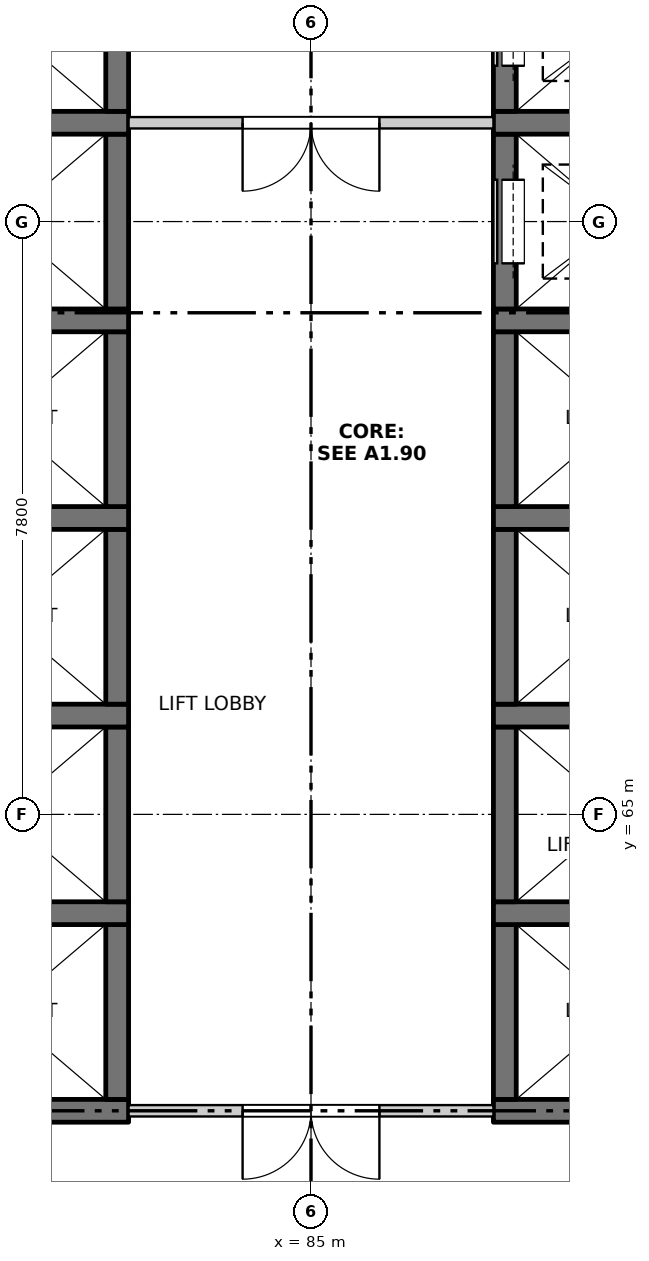
"""IFC4 building model, lengths in metres.
Left out: names, types, materials, properties, quantities, classifications, styles, units other than length and angle.
Written with IfcOpenShell. Run it as: python <this file> out.ifc"""

import sys

from ifc_helpers import new_model, si_unit, direction, frame, frame_2d, origin, place, context, subcontext, project, spatial, rectangle, extrude, element, fill, save


model = new_model("IFC4")
c1 = context("Model", 3, precision=1e-05, world=origin(), true_north=direction((0.0, 1.0)))
c2 = subcontext(c1, "Body", "Model", "MODEL_VIEW")
j1 = project(units=[si_unit("LENGTHUNIT", "METRE"), si_unit("PLANEANGLEUNIT", "RADIAN")], contexts=[c1])
p1 = place(None, origin())
s1 = spatial("IfcSite", under=j1, at=p1, CompositionType="ELEMENT")
p2 = place(p1, origin())
s2 = spatial("IfcBuilding", under=s1, at=p2, CompositionType="ELEMENT")
p3 = place(p2, frame((0.0, 0.0, 137.3)))
s3 = spatial("IfcBuildingStorey", under=s2, at=p3, CompositionType="ELEMENT", Elevation=137.3)
p4 = place(p3, frame((79.6, 61.1, -0.25), z_axis=(0.0, 0.0, 1.0), x_axis=(1.0, 0.0, 0.0)))
e1 = element("IfcWall", 1, at=p4, inside=s3, PredefinedType="SOLIDWALL", context=c2, shape_type="SweptSolid", body=[
    extrude(rectangle(XDim=3.0, YDim=0.3, at=frame_2d((1.5, 0.0))), origin(), (0.0, 0.0, 1.0), 3.4),
])
p5 = place(p3, frame((82.45, 61.25, -0.25), z_axis=(0.0, 0.0, 1.0), x_axis=(0.0, 1.0, 0.0)))
e2 = element("IfcWall", 2, at=p5, inside=s3, PredefinedType="SOLIDWALL", context=c2, shape_type="SweptSolid", body=[
    extrude(rectangle(XDim=2.3, YDim=0.3, at=frame_2d((1.15, 0.0))), origin(), (0.0, 0.0, 1.0), 3.4),
])
p6 = place(p3, frame((79.6, 63.7, -0.25), z_axis=(0.0, 0.0, 1.0), x_axis=(1.0, 0.0, 0.0)))
e3 = element("IfcWall", 3, at=p6, inside=s3, PredefinedType="SOLIDWALL", context=c2, shape_type="SweptSolid", body=[
    extrude(rectangle(XDim=3.0, YDim=0.3, at=frame_2d((1.5, 0.0))), origin(), (0.0, 0.0, 1.0), 3.4),
])
p7 = place(p3, frame((82.45, 63.85, -0.25), z_axis=(0.0, 0.0, 1.0), x_axis=(0.0, 1.0, 0.0)))
e4 = element("IfcWall", 4, at=p7, inside=s3, PredefinedType="SOLIDWALL", context=c2, shape_type="SweptSolid", body=[
    extrude(rectangle(XDim=2.3, YDim=0.3, at=frame_2d((1.15, 0.0))), origin(), (0.0, 0.0, 1.0), 3.4),
])
p8 = place(p3, frame((79.6, 66.3, -0.25), z_axis=(0.0, 0.0, 1.0), x_axis=(1.0, 0.0, 0.0)))
e5 = element("IfcWall", 5, at=p8, inside=s3, PredefinedType="SOLIDWALL", context=c2, shape_type="SweptSolid", body=[
    extrude(rectangle(XDim=3.0, YDim=0.3, at=frame_2d((1.5, 0.0))), origin(), (0.0, 0.0, 1.0), 3.4),
])
p9 = place(p3, frame((82.45, 66.45, -0.25), z_axis=(0.0, 0.0, 1.0), x_axis=(0.0, 1.0, 0.0)))
e6 = element("IfcWall", 6, at=p9, inside=s3, PredefinedType="SOLIDWALL", context=c2, shape_type="SweptSolid", body=[
    extrude(rectangle(XDim=2.3, YDim=0.3, at=frame_2d((1.15, 0.0))), origin(), (0.0, 0.0, 1.0), 3.4),
])
p10 = place(p3, frame((79.6, 68.9, -0.25), z_axis=(0.0, 0.0, 1.0), x_axis=(1.0, 0.0, 0.0)))
e7 = element("IfcWall", 7, at=p10, inside=s3, PredefinedType="SOLIDWALL", context=c2, shape_type="SweptSolid", body=[
    extrude(rectangle(XDim=3.0, YDim=0.3, at=frame_2d((1.5, 0.0))), origin(), (0.0, 0.0, 1.0), 3.4),
])
p11 = place(p3, frame((82.45, 69.05, -0.25), z_axis=(0.0, 0.0, 1.0), x_axis=(0.0, 1.0, 0.0)))
e8 = element("IfcWall", 8, at=p11, inside=s3, PredefinedType="SOLIDWALL", context=c2, shape_type="SweptSolid", body=[
    extrude(rectangle(XDim=2.3, YDim=0.3, at=frame_2d((1.15, 0.0))), origin(), (0.0, 0.0, 1.0), 3.4),
])
p12 = place(p3, frame((79.6, 71.5, -0.25), z_axis=(0.0, 0.0, 1.0), x_axis=(1.0, 0.0, 0.0)))
e9 = element("IfcWall", 9, at=p12, inside=s3, PredefinedType="SOLIDWALL", context=c2, shape_type="SweptSolid", body=[
    extrude(rectangle(XDim=3.0, YDim=0.3, at=frame_2d((1.5, 0.0))), origin(), (0.0, 0.0, 1.0), 3.4),
])
p13 = place(p3, frame((82.45, 71.65, -0.25), z_axis=(0.0, 0.0, 1.0), x_axis=(0.0, 1.0, 0.0)))
e10 = element("IfcWall", 10, at=p13, inside=s3, PredefinedType="SOLIDWALL", context=c2, shape_type="SweptSolid", body=[
    extrude(rectangle(XDim=2.3, YDim=0.3, at=frame_2d((1.15, 0.0))), origin(), (0.0, 0.0, 1.0), 3.4),
])
p14 = place(p3, frame((79.6, 74.1, -0.25), z_axis=(0.0, 0.0, 1.0), x_axis=(1.0, 0.0, 0.0)))
e11 = element("IfcWall", 11, at=p14, inside=s3, PredefinedType="SOLIDWALL", context=c2, shape_type="SweptSolid", body=[
    extrude(rectangle(XDim=3.0, YDim=0.3, at=frame_2d((1.5, 0.0))), origin(), (0.0, 0.0, 1.0), 3.4),
])
p15 = place(p3, frame((82.45, 74.25, -0.25), z_axis=(0.0, 0.0, 1.0), x_axis=(0.0, 1.0, 0.0)))
e12 = element("IfcWall", 12, at=p15, inside=s3, PredefinedType="SOLIDWALL", context=c2, shape_type="SweptSolid", body=[
    extrude(rectangle(XDim=2.3, YDim=0.3, at=frame_2d((1.15, 0.0))), origin(), (0.0, 0.0, 1.0), 3.4),
])
p16 = place(p3, frame((87.4, 61.1, -0.25), z_axis=(0.0, 0.0, 1.0), x_axis=(1.0, 0.0, 0.0)))
e13 = element("IfcWall", 13, at=p16, inside=s3, PredefinedType="SOLIDWALL", context=c2, shape_type="SweptSolid", body=[
    extrude(rectangle(XDim=3.0, YDim=0.3, at=frame_2d((1.5, 0.0))), origin(), (0.0, 0.0, 1.0), 3.4),
])
p17 = place(p3, frame((87.55, 61.25, -0.25), z_axis=(0.0, 0.0, 1.0), x_axis=(0.0, 1.0, 0.0)))
e14 = element("IfcWall", 14, at=p17, inside=s3, PredefinedType="SOLIDWALL", context=c2, shape_type="SweptSolid", body=[
    extrude(rectangle(XDim=2.3, YDim=0.3, at=frame_2d((1.15, 0.0))), origin(), (0.0, 0.0, 1.0), 3.4),
])
p18 = place(p3, frame((87.4, 63.7, -0.25), z_axis=(0.0, 0.0, 1.0), x_axis=(1.0, 0.0, 0.0)))
e15 = element("IfcWall", 15, at=p18, inside=s3, PredefinedType="SOLIDWALL", context=c2, shape_type="SweptSolid", body=[
    extrude(rectangle(XDim=3.0, YDim=0.3, at=frame_2d((1.5, 0.0))), origin(), (0.0, 0.0, 1.0), 3.4),
])
p19 = place(p3, frame((87.55, 63.85, -0.25), z_axis=(0.0, 0.0, 1.0), x_axis=(0.0, 1.0, 0.0)))
e16 = element("IfcWall", 16, at=p19, inside=s3, PredefinedType="SOLIDWALL", context=c2, shape_type="SweptSolid", body=[
    extrude(rectangle(XDim=2.3, YDim=0.3, at=frame_2d((1.15, 0.0))), origin(), (0.0, 0.0, 1.0), 3.4),
])
p20 = place(p3, frame((87.4, 66.3, -0.25), z_axis=(0.0, 0.0, 1.0), x_axis=(1.0, 0.0, 0.0)))
e17 = element("IfcWall", 17, at=p20, inside=s3, PredefinedType="SOLIDWALL", context=c2, shape_type="SweptSolid", body=[
    extrude(rectangle(XDim=3.0, YDim=0.3, at=frame_2d((1.5, 0.0))), origin(), (0.0, 0.0, 1.0), 3.4),
])
p21 = place(p3, frame((87.55, 66.45, -0.25), z_axis=(0.0, 0.0, 1.0), x_axis=(0.0, 1.0, 0.0)))
e18 = element("IfcWall", 18, at=p21, inside=s3, PredefinedType="SOLIDWALL", context=c2, shape_type="SweptSolid", body=[
    extrude(rectangle(XDim=2.3, YDim=0.3, at=frame_2d((1.15, 0.0))), origin(), (0.0, 0.0, 1.0), 3.4),
])
p22 = place(p3, frame((87.4, 68.9, -0.25), z_axis=(0.0, 0.0, 1.0), x_axis=(1.0, 0.0, 0.0)))
e19 = element("IfcWall", 19, at=p22, inside=s3, PredefinedType="SOLIDWALL", context=c2, shape_type="SweptSolid", body=[
    extrude(rectangle(XDim=3.0, YDim=0.3, at=frame_2d((1.5, 0.0))), origin(), (0.0, 0.0, 1.0), 3.4),
])
p23 = place(p3, frame((87.55, 69.05, -0.25), z_axis=(0.0, 0.0, 1.0), x_axis=(0.0, 1.0, 0.0)))
e20 = element("IfcWall", 20, at=p23, inside=s3, PredefinedType="SOLIDWALL", context=c2, shape_type="SweptSolid", body=[
    extrude(rectangle(XDim=2.3, YDim=0.3, at=frame_2d((1.15, 0.0))), origin(), (0.0, 0.0, 1.0), 3.4),
])
p24 = place(p3, frame((87.4, 71.5, -0.25), z_axis=(0.0, 0.0, 1.0), x_axis=(1.0, 0.0, 0.0)))
e21 = element("IfcWall", 21, at=p24, inside=s3, PredefinedType="SOLIDWALL", context=c2, shape_type="SweptSolid", body=[
    extrude(rectangle(XDim=3.0, YDim=0.3, at=frame_2d((1.5, 0.0))), origin(), (0.0, 0.0, 1.0), 3.4),
])
p25 = place(p3, frame((87.55, 71.65, -0.25), z_axis=(0.0, 0.0, 1.0), x_axis=(0.0, 1.0, 0.0)))
e22 = element("IfcWall", 22, at=p25, inside=s3, PredefinedType="SOLIDWALL", context=c2, shape_type="SweptSolid", body=[
    extrude(rectangle(XDim=2.3, YDim=0.3, at=frame_2d((1.15, 0.0))), origin(), (0.0, 0.0, 1.0), 3.4),
])
p26 = place(p25, frame((0.6, 0.0, 0.25)))
e23 = element("IfcOpeningElement", 23, at=p26, cuts=e22, PredefinedType="OPENING", context=c2, shape_type="SweptSolid", body=[
    extrude(rectangle(XDim=1.1, YDim=2.1, at=frame_2d((0.55, 1.05))), frame((0.0, 0.16, 0.0), z_axis=(0.0, -1.0, 0.0), x_axis=(1.0, 0.0, 0.0)), (0.0, 0.0, 1.0), 0.32),
])
p27 = place(p3, frame((87.4, 74.1, -0.25), z_axis=(0.0, 0.0, 1.0), x_axis=(1.0, 0.0, 0.0)))
e24 = element("IfcWall", 24, at=p27, inside=s3, PredefinedType="SOLIDWALL", context=c2, shape_type="SweptSolid", body=[
    extrude(rectangle(XDim=3.0, YDim=0.3, at=frame_2d((1.5, 0.0))), origin(), (0.0, 0.0, 1.0), 3.4),
])
p28 = place(p3, frame((87.55, 74.25, -0.25), z_axis=(0.0, 0.0, 1.0), x_axis=(0.0, 1.0, 0.0)))
e25 = element("IfcWall", 25, at=p28, inside=s3, PredefinedType="SOLIDWALL", context=c2, shape_type="SweptSolid", body=[
    extrude(rectangle(XDim=2.3, YDim=0.3, at=frame_2d((1.15, 0.0))), origin(), (0.0, 0.0, 1.0), 3.4),
])
p29 = place(p28, frame((0.6, 0.0, 0.25)))
e26 = element("IfcOpeningElement", 26, at=p29, cuts=e25, PredefinedType="OPENING", context=c2, shape_type="SweptSolid", body=[
    extrude(rectangle(XDim=1.1, YDim=2.1, at=frame_2d((0.55, 1.05))), frame((0.0, 0.16, 0.0), z_axis=(0.0, -1.0, 0.0), x_axis=(1.0, 0.0, 0.0)), (0.0, 0.0, 1.0), 0.32),
])
p30 = place(p3, frame((82.6, 61.1, 0.0), z_axis=(0.0, 0.0, 1.0), x_axis=(1.0, 0.0, 0.0)))
e27 = element("IfcWall", 27, at=p30, inside=s3, PredefinedType="PARTITIONING", context=c2, shape_type="SweptSolid", body=[
    extrude(rectangle(XDim=4.8, YDim=0.15, at=frame_2d((2.4, 0.0))), origin(), (0.0, 0.0, 1.0), 3.15),
])
p31 = place(p30, frame((1.5, 0.0, 0.0)))
e28 = element("IfcOpeningElement", 28, at=p31, cuts=e27, PredefinedType="OPENING", context=c2, shape_type="SweptSolid", body=[
    extrude(rectangle(XDim=1.8, YDim=2.1, at=frame_2d((0.9, 1.05))), frame((0.0, 0.085, 0.0), z_axis=(0.0, -1.0, 0.0), x_axis=(1.0, 0.0, 0.0)), (0.0, 0.0, 1.0), 0.17),
])
p32 = place(p3, frame((82.6, 74.1, 0.0), z_axis=(0.0, 0.0, 1.0), x_axis=(1.0, 0.0, 0.0)))
e29 = element("IfcWall", 29, at=p32, inside=s3, PredefinedType="PARTITIONING", context=c2, shape_type="SweptSolid", body=[
    extrude(rectangle(XDim=4.8, YDim=0.15, at=frame_2d((2.4, 0.0))), origin(), (0.0, 0.0, 1.0), 3.15),
])
p33 = place(p32, frame((1.5, 0.0, 0.0)))
e30 = element("IfcOpeningElement", 30, at=p33, cuts=e29, PredefinedType="OPENING", context=c2, shape_type="SweptSolid", body=[
    extrude(rectangle(XDim=1.8, YDim=2.1, at=frame_2d((0.9, 1.05))), frame((0.0, 0.085, 0.0), z_axis=(0.0, -1.0, 0.0), x_axis=(1.0, 0.0, 0.0)), (0.0, 0.0, 1.0), 0.17),
])
p34 = place(p31, origin())
e31 = element("IfcDoor", 31, at=p34, inside=s3, OperationType="DOUBLE_DOOR_SINGLE_SWING", PredefinedType="DOOR", context=c2, shape_type="SweptSolid", body=[
    extrude(rectangle(XDim=1.8, YDim=2.1, at=frame_2d((0.9, 1.05))), frame((0.0, 0.025, 0.0), z_axis=(0.0, -1.0, 0.0), x_axis=(1.0, 0.0, 0.0)), (0.0, 0.0, 1.0), 0.05),
])
fill(e28, e31)
p35 = place(p26, origin())
e32 = element("IfcDoor", 32, at=p35, inside=s3, OperationType="SLIDING_TO_LEFT", PredefinedType="DOOR", context=c2, shape_type="SweptSolid", body=[
    extrude(rectangle(XDim=1.1, YDim=2.1, at=frame_2d((0.55, 1.05))), frame((0.0, -0.085, 0.0), z_axis=(0.0, -1.0, 0.0), x_axis=(1.0, 0.0, 0.0)), (0.0, 0.0, 1.0), 0.05),
])
fill(e23, e32)
p36 = place(p33, origin())
e33 = element("IfcDoor", 33, at=p36, inside=s3, OperationType="DOUBLE_DOOR_SINGLE_SWING", PredefinedType="DOOR", context=c2, shape_type="SweptSolid", body=[
    extrude(rectangle(XDim=1.8, YDim=2.1, at=frame_2d((0.9, 1.05))), frame((0.0, 0.025, 0.0), z_axis=(0.0, -1.0, 0.0), x_axis=(1.0, 0.0, 0.0)), (0.0, 0.0, 1.0), 0.05),
])
fill(e30, e33)
p37 = place(p29, origin())
e34 = element("IfcDoor", 34, at=p37, inside=s3, OperationType="SLIDING_TO_LEFT", PredefinedType="DOOR", context=c2, shape_type="SweptSolid", body=[
    extrude(rectangle(XDim=1.1, YDim=2.1, at=frame_2d((0.55, 1.05))), frame((0.0, -0.085, 0.0), z_axis=(0.0, -1.0, 0.0), x_axis=(1.0, 0.0, 0.0)), (0.0, 0.0, 1.0), 0.05),
])
fill(e26, e34)
save(model, sys.argv[1])
